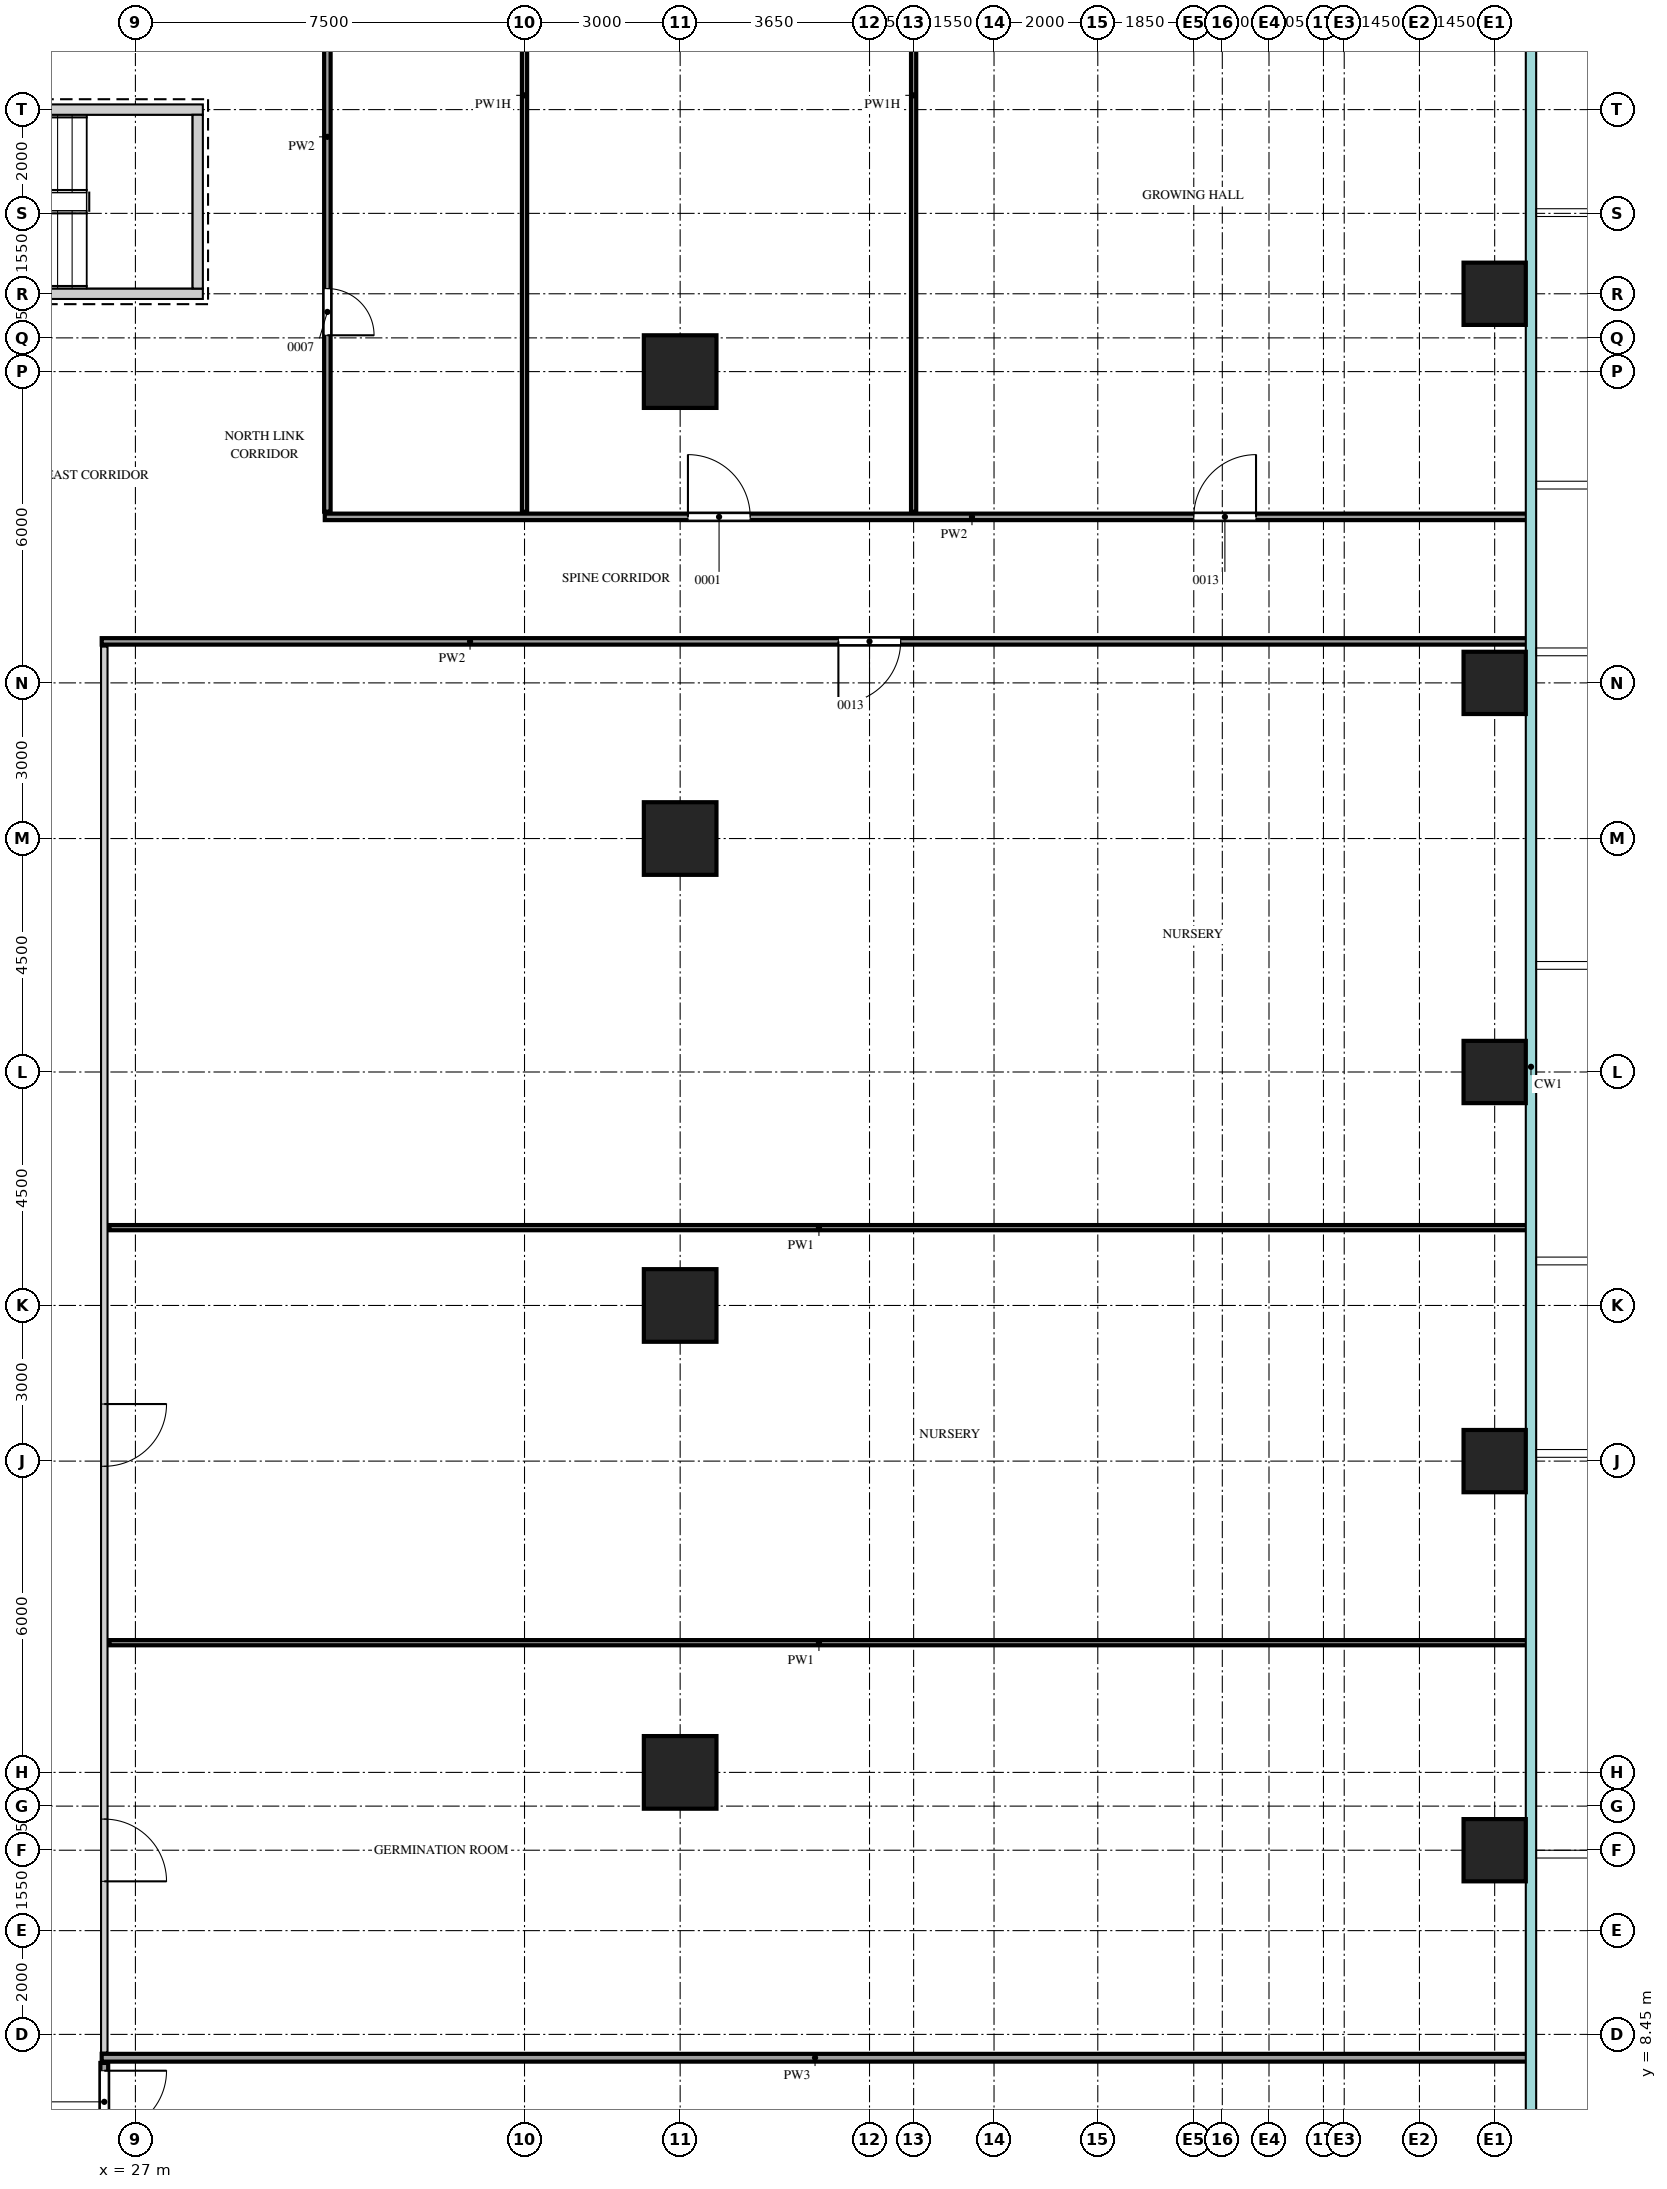
"""IFC4 building model, lengths in metres.
Left out: names, types, materials, properties, quantities, classifications, styles, units other than length and angle.
Written with IfcOpenShell. Run it as: python <this file> out.ifc"""

import sys

from ifc_helpers import new_model, si_unit, direction, frame, frame_2d, origin, origin_2d, place, context, subcontext, project, spatial, rectangle, extrude, source, transform, mapped, element, fill, save


model = new_model("IFC4")
c1 = context("Model", 3, precision=1e-05, world=origin(), true_north=direction((0.0, 1.0)))
c2 = subcontext(c1, "Body", "Model", "MODEL_VIEW")
j1 = project(units=[si_unit("LENGTHUNIT", "METRE"), si_unit("PLANEANGLEUNIT", "RADIAN")], contexts=[c1])
p1 = place(None, origin())
s1 = spatial("IfcSite", under=j1, at=p1, CompositionType="ELEMENT")
p2 = place(p1, origin())
s2 = spatial("IfcBuilding", under=s1, at=p2, CompositionType="ELEMENT")
p3 = place(p2, frame((0.0, 0.0, 46.5)))
s3 = spatial("IfcBuildingStorey", under=s2, at=p3, CompositionType="ELEMENT", Elevation=46.5)
m1 = source(origin(), c2, "Body", "SweptSolid", [
    extrude(rectangle(XDim=7.1, YDim=0.2, at=frame_2d((3.55, 0.0))), origin(), (0.0, 0.0, 1.0), 4.2),
])
p4 = place(p3, frame((21.2, 45.55, 0.0), z_axis=(0.0, 0.0, 1.0), x_axis=(1.0, 0.0, 0.0)))
e1 = element("IfcWall", 1, at=p4, inside=s3, PredefinedType="SHEAR", context=c2, shape_type="MappedRepresentation", body=[
    mapped(m1, transform((0.0, 0.0, 0.0))),
])
m2 = source(origin(), c2, "Body", "SweptSolid", [
    extrude(rectangle(XDim=1.2, YDim=2.1, at=frame_2d((0.6, 1.05))), frame((0.0, 0.11, 0.0), z_axis=(0.0, -1.0, 0.0), x_axis=(1.0, 0.0, 0.0)), (0.0, 0.0, 1.0), 0.22),
])
p5 = place(p4, frame((0.15, 0.0, 0.0)))
e2 = element("IfcOpeningElement", 2, at=p5, cuts=e1, PredefinedType="OPENING", context=c2, shape_type="MappedRepresentation", body=[
    mapped(m2, transform((0.0, 0.0, 0.0))),
])
p6 = place(p3, frame((21.2, 42.0, 0.0), z_axis=(0.0, 0.0, 1.0), x_axis=(1.0, 0.0, 0.0)))
e3 = element("IfcWall", 3, at=p6, inside=s3, PredefinedType="SHEAR", context=c2, shape_type="MappedRepresentation", body=[
    mapped(m1, transform((0.0, 0.0, 0.0))),
])
m3 = source(origin(), c2, "Body", "SweptSolid", [
    extrude(rectangle(XDim=3.35, YDim=0.2, at=frame_2d((1.675, 0.0))), origin(), (0.0, 0.0, 1.0), 4.2),
])
p7 = place(p3, frame((28.2, 42.1, 0.0), z_axis=(0.0, 0.0, 1.0), x_axis=(0.0, 1.0, 0.0)))
e4 = element("IfcWall", 4, at=p7, inside=s3, PredefinedType="SHEAR", context=c2, shape_type="MappedRepresentation", body=[
    mapped(m3, transform((0.0, 0.0, 0.0))),
])
m4 = source(origin(), c2, "Body", "SweptSolid", [
    extrude(rectangle(XDim=1.2, YDim=1.2, at=origin_2d()), origin(), (0.0, 0.0, 1.0), 4.2),
])
for number, where, z_axis, x_axis in (
    (5, (53.2, 12.0, 0.0), (0.0, 0.0, 1.0), (1.0, 0.0, 0.0)),
    (6, (53.2, 19.5, 0.0), (0.0, 0.0, 1.0), (1.0, 0.0, 0.0)),
    (7, (53.2, 27.0, 0.0), (0.0, 0.0, 1.0), (1.0, 0.0, 0.0)),
    (8, (53.2, 34.5, 0.0), (0.0, 0.0, 1.0), (1.0, 0.0, 0.0)),
    (9, (53.2, 42.0, 0.0), (0.0, 0.0, 1.0), (1.0, 0.0, 0.0)),
):
    element("IfcColumn", number, at=place(p3, frame(where, z_axis=z_axis, x_axis=x_axis)), inside=s3, PredefinedType="COLUMN", context=c2, shape_type="MappedRepresentation", body=[
        mapped(m4, transform((0.0, 0.0, 0.0))),
    ])
m5 = source(origin(), c2, "Body", "SweptSolid", [
    extrude(rectangle(XDim=1.4, YDim=1.4, at=origin_2d()), origin(), (0.0, 0.0, 1.0), 4.2),
])
for number, where, z_axis, x_axis in (
    (10, (37.5, 13.5, 0.0), (0.0, 0.0, 1.0), (1.0, 0.0, 0.0)),
    (11, (37.5, 22.5, 0.0), (0.0, 0.0, 1.0), (1.0, 0.0, 0.0)),
    (12, (37.5, 31.5, 0.0), (0.0, 0.0, 1.0), (1.0, 0.0, 0.0)),
    (13, (37.5, 40.5, 0.0), (0.0, 0.0, 1.0), (1.0, 0.0, 0.0)),
):
    element("IfcColumn", number, at=place(p3, frame(where, z_axis=z_axis, x_axis=x_axis)), inside=s3, PredefinedType="COLUMN", context=c2, shape_type="MappedRepresentation", body=[
        mapped(m5, transform((0.0, 0.0, 0.0))),
    ])
m6 = source(origin(), c2, "Body", "SweptSolid", [
    extrude(rectangle(XDim=7.75, YDim=0.15, at=frame_2d((3.875, 0.0))), origin(), (0.0, 0.0, 1.0), 4.3),
])
p8 = place(p3, frame((26.4, 0.15, 0.0), z_axis=(0.0, 0.0, 1.0), x_axis=(0.0, 1.0, 0.0)))
e14 = element("IfcWall", 14, at=p8, inside=s3, PredefinedType="PARTITIONING", context=c2, shape_type="MappedRepresentation", body=[
    mapped(m6, transform((0.0, 0.0, 0.0))),
])
m7 = source(origin(), c2, "Body", "SweptSolid", [
    extrude(rectangle(XDim=1.2, YDim=2.1, at=frame_2d((0.6, 1.05))), frame((0.0, 0.085, 0.0), z_axis=(0.0, -1.0, 0.0), x_axis=(1.0, 0.0, 0.0)), (0.0, 0.0, 1.0), 0.17),
])
p9 = place(p8, frame((6.4, 0.0, 0.0)))
e15 = element("IfcOpeningElement", 15, at=p9, cuts=e14, PredefinedType="OPENING", context=c2, shape_type="MappedRepresentation", body=[
    mapped(m7, transform((0.0, 0.0, 0.0))),
])
m8 = source(origin(), c2, "Body", "SweptSolid", [
    extrude(rectangle(XDim=27.5, YDim=0.15, at=frame_2d((13.75, 0.0))), origin(), (0.0, 0.0, 1.0), 4.3),
])
p10 = place(p3, frame((26.35, 8.0, 0.0), z_axis=(0.0, 0.0, 1.0), x_axis=(1.0, 0.0, 0.0)))
e16 = element("IfcWall", 16, at=p10, inside=s3, PredefinedType="PARTITIONING", context=c2, shape_type="MappedRepresentation", body=[
    mapped(m8, transform((0.0, 0.0, 0.0))),
])
m9 = source(origin(), c2, "Body", "SweptSolid", [
    extrude(rectangle(XDim=27.1, YDim=0.125, at=frame_2d((13.55, 0.0))), origin(), (0.0, 0.0, 1.0), 4.3),
])
p11 = place(p3, frame((26.4, 8.1, 0.0), z_axis=(0.0, 0.0, 1.0), x_axis=(0.0, 1.0, 0.0)))
e17 = element("IfcWall", 17, at=p11, inside=s3, PredefinedType="PARTITIONING", context=c2, shape_type="MappedRepresentation", body=[
    mapped(m9, transform((0.0, 0.0, 0.0))),
])
m10 = source(origin(), c2, "Body", "SweptSolid", [
    extrude(rectangle(XDim=1.2, YDim=2.1, at=frame_2d((0.6, 1.05))), frame((0.0, 0.073, 0.0), z_axis=(0.0, -1.0, 0.0), x_axis=(1.0, 0.0, 0.0)), (0.0, 0.0, 1.0), 0.145),
])
p12 = place(p11, frame((3.3, 0.0, 0.0)))
e18 = element("IfcOpeningElement", 18, at=p12, cuts=e17, PredefinedType="OPENING", context=c2, shape_type="MappedRepresentation", body=[
    mapped(m10, transform((0.0, 0.0, 0.0))),
])
p13 = place(p11, frame((11.3, 0.0, 0.0)))
e19 = element("IfcOpeningElement", 19, at=p13, cuts=e17, PredefinedType="OPENING", context=c2, shape_type="MappedRepresentation", body=[
    mapped(m10, transform((0.0, 0.0, 0.0))),
])
m11 = source(origin(), c2, "Body", "SweptSolid", [
    extrude(rectangle(XDim=27.35, YDim=0.1, at=frame_2d((13.675, 0.0))), origin(), (0.0, 0.0, 1.0), 4.3),
])
for number, where, z_axis, x_axis in (
    (20, (26.5, 16.0, 0.0), (0.0, 0.0, 1.0), (1.0, 0.0, 0.0)),
    (21, (26.5, 24.0, 0.0), (0.0, 0.0, 1.0), (1.0, 0.0, 0.0)),
):
    element("IfcWall", number, at=place(p3, frame(where, z_axis=z_axis, x_axis=x_axis)), inside=s3, PredefinedType="PARTITIONING", context=c2, shape_type="MappedRepresentation", body=[
        mapped(m11, transform((0.0, 0.0, 0.0))),
    ])
m12 = source(origin(), c2, "Body", "SweptSolid", [
    extrude(rectangle(XDim=27.5, YDim=0.125, at=frame_2d((13.75, 0.0))), origin(), (0.0, 0.0, 1.0), 4.3),
])
p14 = place(p3, frame((26.35, 35.3, 0.0), z_axis=(0.0, 0.0, 1.0), x_axis=(1.0, 0.0, 0.0)))
e22 = element("IfcWall", 22, at=p14, inside=s3, PredefinedType="PARTITIONING", context=c2, shape_type="MappedRepresentation", body=[
    mapped(m12, transform((0.0, 0.0, 0.0))),
])
p15 = place(p14, frame((14.2, 0.0, 0.0)))
e23 = element("IfcOpeningElement", 23, at=p15, cuts=e22, PredefinedType="OPENING", context=c2, shape_type="MappedRepresentation", body=[
    mapped(m10, transform((0.0, 0.0, 0.0))),
])
m13 = source(origin(), c2, "Body", "SweptSolid", [
    extrude(rectangle(XDim=23.2, YDim=0.125, at=frame_2d((11.6, 0.0))), origin(), (0.0, 0.0, 1.0), 4.3),
])
p16 = place(p3, frame((30.65, 37.7, 0.0), z_axis=(0.0, 0.0, 1.0), x_axis=(1.0, 0.0, 0.0)))
e24 = element("IfcWall", 24, at=p16, inside=s3, PredefinedType="PARTITIONING", context=c2, shape_type="MappedRepresentation", body=[
    mapped(m13, transform((0.0, 0.0, 0.0))),
])
p17 = place(p16, frame((7.0, 0.0, 0.0)))
e25 = element("IfcOpeningElement", 25, at=p17, cuts=e24, PredefinedType="OPENING", context=c2, shape_type="MappedRepresentation", body=[
    mapped(m10, transform((0.0, 0.0, 0.0))),
])
p18 = place(p16, frame((16.75, 0.0, 0.0)))
e26 = element("IfcOpeningElement", 26, at=p18, cuts=e24, PredefinedType="OPENING", context=c2, shape_type="MappedRepresentation", body=[
    mapped(m10, transform((0.0, 0.0, 0.0))),
])
m14 = source(origin(), c2, "Body", "SweptSolid", [
    extrude(rectangle(XDim=10.15, YDim=0.125, at=frame_2d((5.075, 0.0))), origin(), (0.0, 0.0, 1.0), 4.3),
])
p19 = place(p3, frame((30.7, 37.8, 0.0), z_axis=(0.0, 0.0, 1.0), x_axis=(0.0, 1.0, 0.0)))
e27 = element("IfcWall", 27, at=p19, inside=s3, PredefinedType="PARTITIONING", context=c2, shape_type="MappedRepresentation", body=[
    mapped(m14, transform((0.0, 0.0, 0.0))),
])
m15 = source(origin(), c2, "Body", "SweptSolid", [
    extrude(rectangle(XDim=0.9, YDim=2.1, at=frame_2d((0.45, 1.05))), frame((0.0, 0.073, 0.0), z_axis=(0.0, -1.0, 0.0), x_axis=(1.0, 0.0, 0.0)), (0.0, 0.0, 1.0), 0.145),
])
p20 = place(p19, frame((3.4, 0.0, 0.0)))
e28 = element("IfcOpeningElement", 28, at=p20, cuts=e27, PredefinedType="OPENING", context=c2, shape_type="MappedRepresentation", body=[
    mapped(m15, transform((0.0, 0.0, 0.0))),
])
m16 = source(origin(), c2, "Body", "SweptSolid", [
    extrude(rectangle(XDim=16.05, YDim=0.1, at=frame_2d((8.025, 0.0))), origin(), (0.0, 0.0, 1.0), 3.7),
])
for number, where, z_axis, x_axis in (
    (29, (34.5, 37.8, 0.0), (0.0, 0.0, 1.0), (0.0, 1.0, 0.0)),
    (30, (42.0, 37.8, 0.0), (0.0, 0.0, 1.0), (0.0, 1.0, 0.0)),
):
    element("IfcWall", number, at=place(p3, frame(where, z_axis=z_axis, x_axis=x_axis)), inside=s3, PredefinedType="PARTITIONING", context=c2, shape_type="MappedRepresentation", body=[
        mapped(m16, transform((0.0, 0.0, 0.0))),
    ])
m17 = source(origin(), c2, "Body", "SweptSolid", [
    extrude(rectangle(XDim=1.2, YDim=2.1, at=frame_2d((0.6, 1.05))), frame((0.0, 0.025, 0.0), z_axis=(0.0, -1.0, 0.0), x_axis=(1.0, 0.0, 0.0)), (0.0, 0.0, 1.0), 0.05),
])
p21 = place(p9, origin())
e31 = element("IfcDoor", 31, at=p21, inside=s3, OperationType="SINGLE_SWING_RIGHT", PredefinedType="DOOR", context=c2, shape_type="MappedRepresentation", body=[
    mapped(m17, transform((0.0, 0.0, 0.0))),
])
fill(e15, e31)
p22 = place(p12, origin())
e32 = element("IfcDoor", 32, at=p22, inside=s3, OperationType="SINGLE_SWING_LEFT", PredefinedType="DOOR", context=c2, shape_type="MappedRepresentation", body=[
    mapped(m17, transform((0.0, 0.0, 0.0))),
])
fill(e18, e32)
p23 = place(p13, origin())
e33 = element("IfcDoor", 33, at=p23, inside=s3, OperationType="SINGLE_SWING_RIGHT", PredefinedType="DOOR", context=c2, shape_type="MappedRepresentation", body=[
    mapped(m17, transform((0.0, 0.0, 0.0))),
])
fill(e19, e33)
p24 = place(p15, origin())
e34 = element("IfcDoor", 34, at=p24, inside=s3, OperationType="SINGLE_SWING_LEFT", PredefinedType="DOOR", context=c2, shape_type="MappedRepresentation", body=[
    mapped(m17, transform((0.0, 0.0, 0.0))),
])
fill(e23, e34)
m18 = source(origin(), c2, "Body", "SweptSolid", [
    extrude(rectangle(XDim=0.9, YDim=2.1, at=frame_2d((0.45, 1.05))), frame((0.0, 0.025, 0.0), z_axis=(0.0, -1.0, 0.0), x_axis=(1.0, 0.0, 0.0)), (0.0, 0.0, 1.0), 0.05),
])
p25 = place(p20, origin())
e35 = element("IfcDoor", 35, at=p25, inside=s3, OperationType="SINGLE_SWING_LEFT", PredefinedType="DOOR", context=c2, shape_type="MappedRepresentation", body=[
    mapped(m18, transform((0.0, 0.0, 0.0))),
])
fill(e28, e35)
p26 = place(p17, origin())
e36 = element("IfcDoor", 36, at=p26, inside=s3, OperationType="SINGLE_SWING_RIGHT", PredefinedType="DOOR", context=c2, shape_type="MappedRepresentation", body=[
    mapped(m17, transform((0.0, 0.0, 0.0))),
])
fill(e25, e36)
p27 = place(p18, origin())
e37 = element("IfcDoor", 37, at=p27, inside=s3, OperationType="SINGLE_SWING_LEFT", PredefinedType="DOOR", context=c2, shape_type="MappedRepresentation", body=[
    mapped(m17, transform((0.0, 0.0, 0.0))),
])
fill(e26, e37)
save(model, sys.argv[1])
